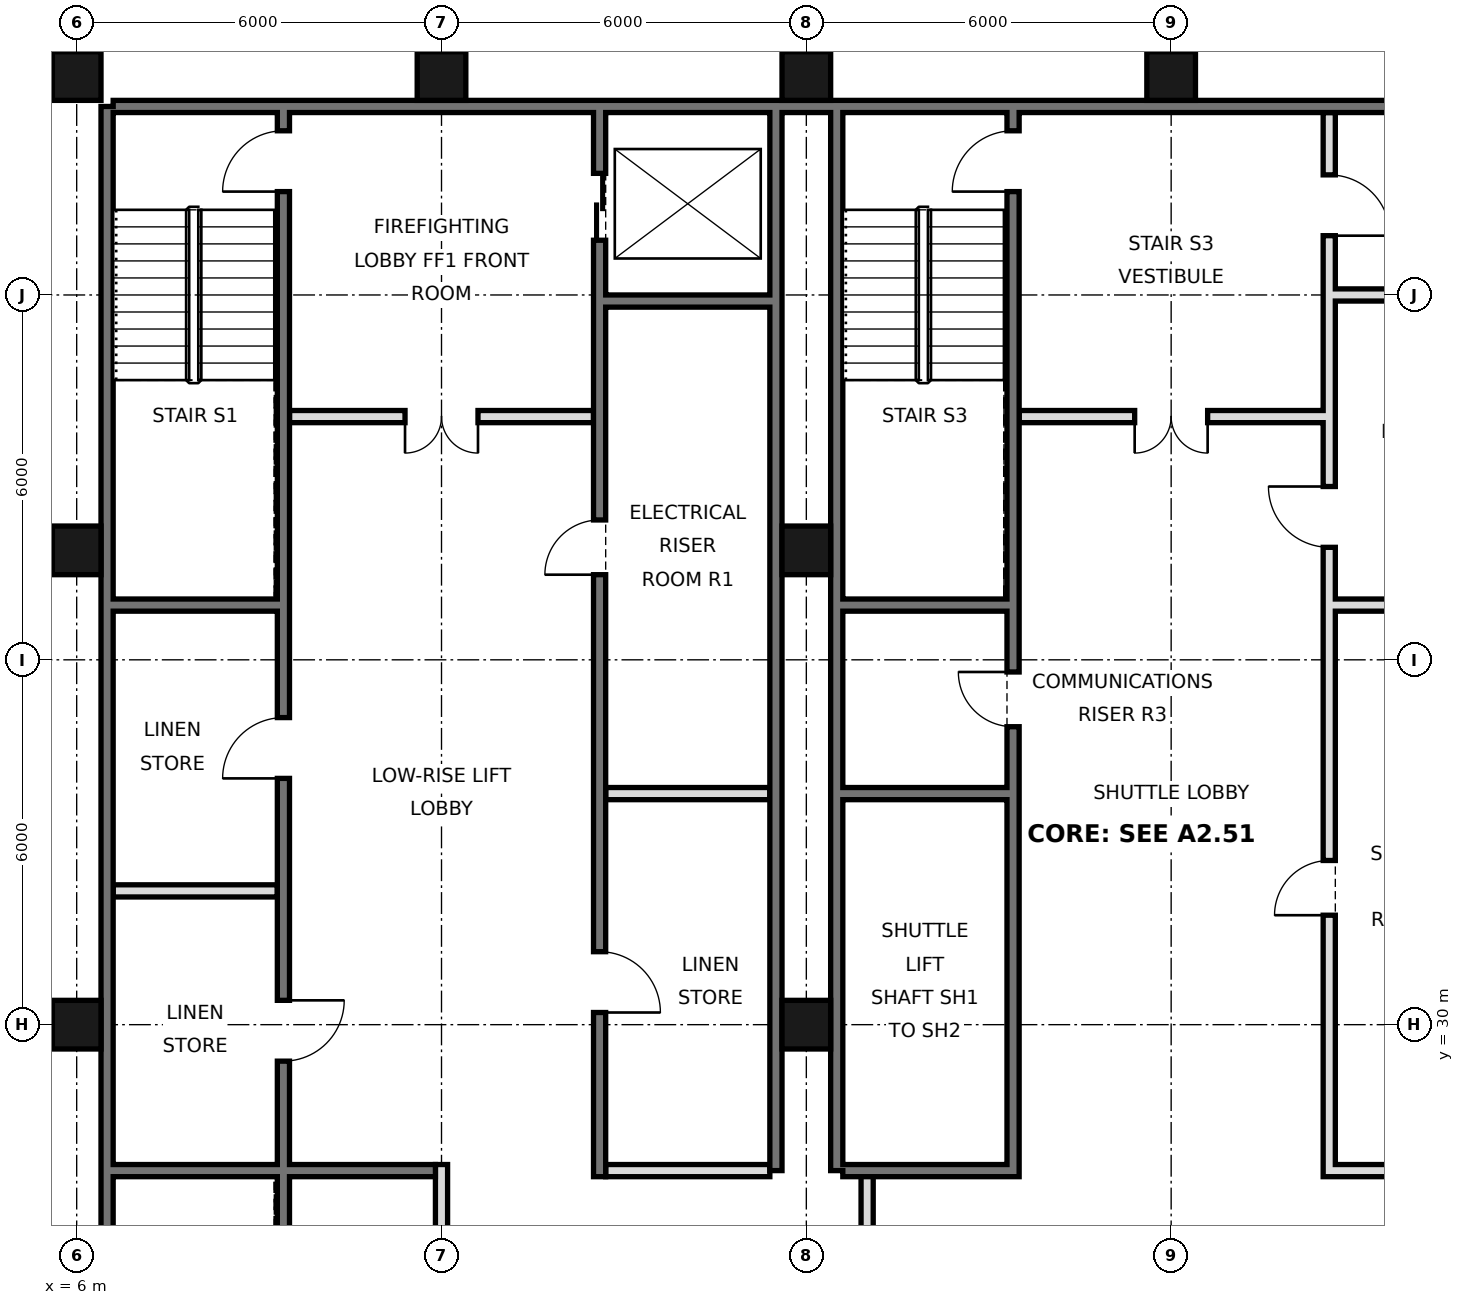
"""IFC4 building model, lengths in metres.
Left out: names, types, materials, properties, quantities, classifications, styles, units other than length and angle.
Written with IfcOpenShell. Run it as: python <this file> out.ifc"""

import sys

from ifc_helpers import new_model, si_unit, direction, frame, frame_2d, origin, origin_2d, place, context, subcontext, project, spatial, rectangle, hollow_rectangle, extrude, element, fill, save


model = new_model("IFC4")
c1 = context("Model", 3, precision=1e-05, world=origin(), true_north=direction((0.0, 1.0)))
c2 = subcontext(c1, "Body", "Model", "MODEL_VIEW")
j1 = project(units=[si_unit("LENGTHUNIT", "METRE"), si_unit("PLANEANGLEUNIT", "RADIAN")], contexts=[c1])
p1 = place(None, origin())
s1 = spatial("IfcSite", under=j1, at=p1, CompositionType="ELEMENT")
p2 = place(p1, origin())
s2 = spatial("IfcBuilding", under=s1, at=p2, CompositionType="ELEMENT")
p3 = place(p2, frame((0.0, 0.0, 202.8)))
s3 = spatial("IfcBuildingStorey", under=s2, at=p3, CompositionType="ELEMENT", Elevation=202.8)
for number, where, z_axis, x_axis in (
    (1, (6.0, 30.0, 0.0), (0.0, 0.0, 1.0), (1.0, 0.0, 0.0)),
    (2, (6.0, 37.8, 0.0), (0.0, 0.0, 1.0), (1.0, 0.0, 0.0)),
    (3, (6.0, 45.6, 0.0), (0.0, 0.0, 1.0), (1.0, 0.0, 0.0)),
    (4, (12.0, 45.6, 0.0), (0.0, 0.0, 1.0), (1.0, 0.0, 0.0)),
    (5, (18.0, 30.0, 0.0), (0.0, 0.0, 1.0), (1.0, 0.0, 0.0)),
    (6, (18.0, 37.8, 0.0), (0.0, 0.0, 1.0), (1.0, 0.0, 0.0)),
    (7, (18.0, 45.6, 0.0), (0.0, 0.0, 1.0), (1.0, 0.0, 0.0)),
    (8, (24.0, 45.6, 0.0), (0.0, 0.0, 1.0), (1.0, 0.0, 0.0)),
):
    element("IfcColumn", number, at=place(p3, frame(where, z_axis=z_axis, x_axis=x_axis)), inside=s3, PredefinedType="COLUMN", context=c2, shape_type="SweptSolid", body=[
        extrude(hollow_rectangle(XDim=0.8, YDim=0.8, WallThickness=0.04, at=origin_2d()), origin(), (0.0, 0.0, 1.0), 3.6),
    ])
p4 = place(p3, frame((6.5, 21.6, 0.0), z_axis=(0.0, 0.0, 1.0), x_axis=(0.0, 1.0, 0.0)))
e9 = element("IfcWall", 9, at=p4, inside=s3, PredefinedType="SOLIDWALL", context=c2, shape_type="SweptSolid", body=[
    extrude(rectangle(XDim=23.5, YDim=0.2, at=frame_2d((11.75, 0.0))), origin(), (0.0, 0.0, 1.0), 3.42),
])
p5 = place(p3, frame((6.6, 45.1, 0.0), z_axis=(0.0, 0.0, 1.0), x_axis=(1.0, 0.0, 0.0)))
e10 = element("IfcWall", 10, at=p5, inside=s3, PredefinedType="SOLIDWALL", context=c2, shape_type="SweptSolid", body=[
    extrude(rectangle(XDim=34.8, YDim=0.2, at=frame_2d((17.4, 0.0))), origin(), (0.0, 0.0, 1.0), 3.42),
])
for number, where, z_axis, x_axis in (
    (11, (17.5, 27.6, 0.0), (0.0, 0.0, 1.0), (0.0, 1.0, 0.0)),
    (12, (18.5, 27.6, 0.0), (0.0, 0.0, 1.0), (0.0, 1.0, 0.0)),
):
    element("IfcWall", number, at=place(p3, frame(where, z_axis=z_axis, x_axis=x_axis)), inside=s3, PredefinedType="SOLIDWALL", context=c2, shape_type="SweptSolid", body=[
        extrude(rectangle(XDim=17.5, YDim=0.2, at=frame_2d((8.75, 0.0))), origin(), (0.0, 0.0, 1.0), 3.42),
    ])
p6 = place(p3, frame((19.0, 21.6, 0.0), z_axis=(0.0, 0.0, 1.0), x_axis=(0.0, 1.0, 0.0)))
e13 = element("IfcWall", 13, at=p6, inside=s3, PredefinedType="PARTITIONING", context=c2, shape_type="SweptSolid", body=[
    extrude(rectangle(XDim=6.0, YDim=0.2, at=frame_2d((3.0, 0.0))), origin(), (0.0, 0.0, 1.0), 3.42),
])
p7 = place(p6, frame((2.1, 0.0, 0.0)))
e14 = element("IfcOpeningElement", 14, at=p7, cuts=e13, PredefinedType="OPENING", context=c2, shape_type="SweptSolid", body=[
    extrude(rectangle(XDim=1.8, YDim=2.1, at=frame_2d((0.9, 1.05))), frame((0.0, 0.11, 0.0), z_axis=(0.0, -1.0, 0.0), x_axis=(1.0, 0.0, 0.0)), (0.0, 0.0, 1.0), 0.22),
])
p8 = place(p3, frame((12.0, 21.6, 0.0), z_axis=(0.0, 0.0, 1.0), x_axis=(0.0, 1.0, 0.0)))
e15 = element("IfcWall", 15, at=p8, inside=s3, PredefinedType="PARTITIONING", context=c2, shape_type="SweptSolid", body=[
    extrude(rectangle(XDim=6.1, YDim=0.2, at=frame_2d((3.05, 0.0))), origin(), (0.0, 0.0, 1.0), 3.42),
])
p9 = place(p3, frame((14.6, 27.5, 0.0), z_axis=(0.0, 0.0, 1.0), x_axis=(0.0, 1.0, 0.0)))
e16 = element("IfcWall", 16, at=p9, inside=s3, PredefinedType="SOLIDWALL", context=c2, shape_type="SweptSolid", body=[
    extrude(rectangle(XDim=17.5, YDim=0.2, at=frame_2d((8.75, 0.0))), origin(), (0.0, 0.0, 1.0), 3.42),
])
p10 = place(p9, frame((15.4, 0.0, 0.0)))
e17 = element("IfcOpeningElement", 17, at=p10, cuts=e16, PredefinedType="OPENING", context=c2, shape_type="SweptSolid", body=[
    extrude(rectangle(XDim=1.1, YDim=2.1, at=frame_2d((0.55, 1.05))), frame((0.0, 0.11, 0.0), z_axis=(0.0, -1.0, 0.0), x_axis=(1.0, 0.0, 0.0)), (0.0, 0.0, 1.0), 0.22),
])
p11 = place(p9, frame((2.7, 0.0, 0.0)))
e18 = element("IfcOpeningElement", 18, at=p11, cuts=e16, PredefinedType="OPENING", context=c2, shape_type="SweptSolid", body=[
    extrude(rectangle(XDim=1.0, YDim=2.1, at=frame_2d((0.5, 1.05))), frame((0.0, 0.11, 0.0), z_axis=(0.0, -1.0, 0.0), x_axis=(1.0, 0.0, 0.0)), (0.0, 0.0, 1.0), 0.22),
])
p12 = place(p9, frame((9.9, 0.0, 0.0)))
e19 = element("IfcOpeningElement", 19, at=p12, cuts=e16, PredefinedType="OPENING", context=c2, shape_type="SweptSolid", body=[
    extrude(rectangle(XDim=0.9, YDim=2.1, at=frame_2d((0.45, 1.05))), frame((0.0, 0.11, 0.0), z_axis=(0.0, -1.0, 0.0), x_axis=(1.0, 0.0, 0.0)), (0.0, 0.0, 1.0), 0.22),
])
p13 = place(p3, frame((21.4, 27.5, 0.0), z_axis=(0.0, 0.0, 1.0), x_axis=(0.0, 1.0, 0.0)))
e20 = element("IfcWall", 20, at=p13, inside=s3, PredefinedType="SOLIDWALL", context=c2, shape_type="SweptSolid", body=[
    extrude(rectangle(XDim=17.5, YDim=0.2, at=frame_2d((8.75, 0.0))), origin(), (0.0, 0.0, 1.0), 3.42),
])
p14 = place(p13, frame((16.2, 0.0, 0.0)))
e21 = element("IfcOpeningElement", 21, at=p14, cuts=e20, PredefinedType="OPENING", context=c2, shape_type="SweptSolid", body=[
    extrude(rectangle(XDim=1.0, YDim=2.1, at=frame_2d((0.5, 1.05))), frame((0.0, 0.11, 0.0), z_axis=(0.0, -1.0, 0.0), x_axis=(1.0, 0.0, 0.0)), (0.0, 0.0, 1.0), 0.22),
])
p15 = place(p13, frame((7.4, 0.0, 0.0)))
e22 = element("IfcOpeningElement", 22, at=p15, cuts=e20, PredefinedType="OPENING", context=c2, shape_type="SweptSolid", body=[
    extrude(rectangle(XDim=0.9, YDim=2.1, at=frame_2d((0.45, 1.05))), frame((0.0, 0.11, 0.0), z_axis=(0.0, -1.0, 0.0), x_axis=(1.0, 0.0, 0.0)), (0.0, 0.0, 1.0), 0.22),
])
p16 = place(p3, frame((26.6, 27.5, 0.0), z_axis=(0.0, 0.0, 1.0), x_axis=(0.0, 1.0, 0.0)))
e23 = element("IfcWall", 23, at=p16, inside=s3, PredefinedType="SOLIDWALL", context=c2, shape_type="SweptSolid", body=[
    extrude(rectangle(XDim=17.5, YDim=0.2, at=frame_2d((8.75, 0.0))), origin(), (0.0, 0.0, 1.0), 3.42),
])
p17 = place(p16, frame((4.3, 0.0, 0.0)))
e24 = element("IfcOpeningElement", 24, at=p17, cuts=e23, PredefinedType="OPENING", context=c2, shape_type="SweptSolid", body=[
    extrude(rectangle(XDim=0.9, YDim=2.1, at=frame_2d((0.45, 1.05))), frame((0.0, 0.11, 0.0), z_axis=(0.0, -1.0, 0.0), x_axis=(1.0, 0.0, 0.0)), (0.0, 0.0, 1.0), 0.22),
])
p18 = place(p16, frame((10.35, 0.0, 0.0)))
e25 = element("IfcOpeningElement", 25, at=p18, cuts=e23, PredefinedType="OPENING", context=c2, shape_type="SweptSolid", body=[
    extrude(rectangle(XDim=1.0, YDim=2.1, at=frame_2d((0.5, 1.05))), frame((0.0, 0.11, 0.0), z_axis=(0.0, -1.0, 0.0), x_axis=(1.0, 0.0, 0.0)), (0.0, 0.0, 1.0), 0.22),
])
p19 = place(p16, frame((15.475, 0.0, 0.0)))
e26 = element("IfcOpeningElement", 26, at=p19, cuts=e23, PredefinedType="OPENING", context=c2, shape_type="SweptSolid", body=[
    extrude(rectangle(XDim=1.0, YDim=2.1, at=frame_2d((0.5, 1.05))), frame((0.0, 0.11, 0.0), z_axis=(0.0, -1.0, 0.0), x_axis=(1.0, 0.0, 0.0)), (0.0, 0.0, 1.0), 0.22),
])
p20 = place(p3, frame((9.4, 21.6, 0.0), z_axis=(0.0, 0.0, 1.0), x_axis=(0.0, 1.0, 0.0)))
e27 = element("IfcWall", 27, at=p20, inside=s3, PredefinedType="SOLIDWALL", context=c2, shape_type="SweptSolid", body=[
    extrude(rectangle(XDim=23.4, YDim=0.2, at=frame_2d((11.7, 0.0))), origin(), (0.0, 0.0, 1.0), 3.42),
])
p21 = place(p20, frame((7.8, 0.0, 0.0)))
e28 = element("IfcOpeningElement", 28, at=p21, cuts=e27, PredefinedType="OPENING", context=c2, shape_type="SweptSolid", body=[
    extrude(rectangle(XDim=1.0, YDim=2.1, at=frame_2d((0.5, 1.05))), frame((0.0, 0.11, 0.0), z_axis=(0.0, -1.0, 0.0), x_axis=(1.0, 0.0, 0.0)), (0.0, 0.0, 1.0), 0.22),
])
p22 = place(p20, frame((12.45, 0.0, 0.0)))
e29 = element("IfcOpeningElement", 29, at=p22, cuts=e27, PredefinedType="OPENING", context=c2, shape_type="SweptSolid", body=[
    extrude(rectangle(XDim=1.0, YDim=2.1, at=frame_2d((0.5, 1.05))), frame((0.0, 0.11, 0.0), z_axis=(0.0, -1.0, 0.0), x_axis=(1.0, 0.0, 0.0)), (0.0, 0.0, 1.0), 0.22),
])
p23 = place(p20, frame((22.1, 0.0, 0.0)))
e30 = element("IfcOpeningElement", 30, at=p23, cuts=e27, PredefinedType="OPENING", context=c2, shape_type="SweptSolid", body=[
    extrude(rectangle(XDim=1.0, YDim=2.1, at=frame_2d((0.5, 1.05))), frame((0.0, 0.11, 0.0), z_axis=(0.0, -1.0, 0.0), x_axis=(1.0, 0.0, 0.0)), (0.0, 0.0, 1.0), 0.22),
])
p24 = place(p20, frame((0.175, 0.0, 0.0)))
e31 = element("IfcOpeningElement", 31, at=p24, cuts=e27, PredefinedType="OPENING", context=c2, shape_type="SweptSolid", body=[
    extrude(rectangle(XDim=0.9, YDim=2.1, at=frame_2d((0.45, 1.05))), frame((0.0, 0.11, 0.0), z_axis=(0.0, -1.0, 0.0), x_axis=(1.0, 0.0, 0.0)), (0.0, 0.0, 1.0), 0.22),
])
p25 = place(p3, frame((14.7, 27.6, 0.0), z_axis=(0.0, 0.0, 1.0), x_axis=(1.0, 0.0, 0.0)))
e32 = element("IfcWall", 32, at=p25, inside=s3, PredefinedType="PARTITIONING", context=c2, shape_type="SweptSolid", body=[
    extrude(rectangle(XDim=2.7, YDim=0.2, at=frame_2d((1.35, 0.0))), origin(), (0.0, 0.0, 1.0), 3.42),
])
for number, where, z_axis, x_axis in (
    (33, (18.6, 27.6, 0.0), (0.0, 0.0, 1.0), (1.0, 0.0, 0.0)),
    (34, (26.7, 27.6, 0.0), (0.0, 0.0, 1.0), (1.0, 0.0, 0.0)),
):
    element("IfcWall", number, at=place(p3, frame(where, z_axis=z_axis, x_axis=x_axis)), inside=s3, PredefinedType="SOLIDWALL", context=c2, shape_type="SweptSolid", body=[
        extrude(rectangle(XDim=2.7, YDim=0.2, at=frame_2d((1.35, 0.0))), origin(), (0.0, 0.0, 1.0), 3.42),
    ])
p26 = place(p3, frame((6.6, 27.6, 0.0), z_axis=(0.0, 0.0, 1.0), x_axis=(1.0, 0.0, 0.0)))
e35 = element("IfcWall", 35, at=p26, inside=s3, PredefinedType="SOLIDWALL", context=c2, shape_type="SweptSolid", body=[
    extrude(rectangle(XDim=5.3, YDim=0.2, at=frame_2d((2.65, 0.0))), origin(), (0.0, 0.0, 1.0), 3.42),
])
p27 = place(p3, frame((6.6, 32.2, 0.0), z_axis=(0.0, 0.0, 1.0), x_axis=(1.0, 0.0, 0.0)))
e36 = element("IfcWall", 36, at=p27, inside=s3, PredefinedType="PARTITIONING", context=c2, shape_type="SweptSolid", body=[
    extrude(rectangle(XDim=2.7, YDim=0.2, at=frame_2d((1.35, 0.0))), origin(), (0.0, 0.0, 1.0), 3.42),
])
for number, where, z_axis, x_axis in (
    (37, (14.7, 33.8, 0.0), (0.0, 0.0, 1.0), (1.0, 0.0, 0.0)),
    (38, (18.6, 33.8, 0.0), (0.0, 0.0, 1.0), (1.0, 0.0, 0.0)),
    (39, (18.6, 36.9, 0.0), (0.0, 0.0, 1.0), (1.0, 0.0, 0.0)),
    (40, (26.7, 36.9, 0.0), (0.0, 0.0, 1.0), (1.0, 0.0, 0.0)),
    (41, (6.6, 36.9, 0.0), (0.0, 0.0, 1.0), (1.0, 0.0, 0.0)),
):
    element("IfcWall", number, at=place(p3, frame(where, z_axis=z_axis, x_axis=x_axis)), inside=s3, PredefinedType="SOLIDWALL", context=c2, shape_type="SweptSolid", body=[
        extrude(rectangle(XDim=2.7, YDim=0.2, at=frame_2d((1.35, 0.0))), origin(), (0.0, 0.0, 1.0), 3.42),
    ])
p28 = place(p3, frame((21.5, 40.0, 0.0), z_axis=(0.0, 0.0, 1.0), x_axis=(1.0, 0.0, 0.0)))
e42 = element("IfcWall", 42, at=p28, inside=s3, PredefinedType="PARTITIONING", context=c2, shape_type="SweptSolid", body=[
    extrude(rectangle(XDim=5.0, YDim=0.2, at=frame_2d((2.5, 0.0))), origin(), (0.0, 0.0, 1.0), 3.42),
])
p29 = place(p28, frame((1.9, 0.0, 0.0)))
e43 = element("IfcOpeningElement", 43, at=p29, cuts=e42, PredefinedType="OPENING", context=c2, shape_type="SweptSolid", body=[
    extrude(rectangle(XDim=1.2, YDim=2.1, at=frame_2d((0.6, 1.05))), frame((0.0, 0.11, 0.0), z_axis=(0.0, -1.0, 0.0), x_axis=(1.0, 0.0, 0.0)), (0.0, 0.0, 1.0), 0.22),
])
p30 = place(p3, frame((9.5, 40.0, 0.0), z_axis=(0.0, 0.0, 1.0), x_axis=(1.0, 0.0, 0.0)))
e44 = element("IfcWall", 44, at=p30, inside=s3, PredefinedType="PARTITIONING", context=c2, shape_type="SweptSolid", body=[
    extrude(rectangle(XDim=5.0, YDim=0.2, at=frame_2d((2.5, 0.0))), origin(), (0.0, 0.0, 1.0), 3.42),
])
p31 = place(p30, frame((1.9, 0.0, 0.0)))
e45 = element("IfcOpeningElement", 45, at=p31, cuts=e44, PredefinedType="OPENING", context=c2, shape_type="SweptSolid", body=[
    extrude(rectangle(XDim=1.2, YDim=2.1, at=frame_2d((0.6, 1.05))), frame((0.0, 0.11, 0.0), z_axis=(0.0, -1.0, 0.0), x_axis=(1.0, 0.0, 0.0)), (0.0, 0.0, 1.0), 0.22),
])
p32 = place(p3, frame((14.7, 41.9, 0.0), z_axis=(0.0, 0.0, 1.0), x_axis=(1.0, 0.0, 0.0)))
e46 = element("IfcWall", 46, at=p32, inside=s3, PredefinedType="SOLIDWALL", context=c2, shape_type="SweptSolid", body=[
    extrude(rectangle(XDim=2.7, YDim=0.2, at=frame_2d((1.35, 0.0))), origin(), (0.0, 0.0, 1.0), 3.42),
])
p33 = place(p3, frame((26.7, 42.0, 0.0), z_axis=(0.0, 0.0, 1.0), x_axis=(1.0, 0.0, 0.0)))
e47 = element("IfcWall", 47, at=p33, inside=s3, PredefinedType="PARTITIONING", context=c2, shape_type="SweptSolid", body=[
    extrude(rectangle(XDim=2.7, YDim=0.2, at=frame_2d((1.35, 0.0))), origin(), (0.0, 0.0, 1.0), 3.42),
])
p34 = place(p31, frame((1.2, 0.0, 0.0), z_axis=(0.0, 0.0, 1.0), x_axis=(-1.0, 0.0, 0.0)))
e48 = element("IfcDoor", 48, at=p34, inside=s3, OperationType="DOUBLE_DOOR_SINGLE_SWING", PredefinedType="DOOR", context=c2, shape_type="SweptSolid", body=[
    extrude(rectangle(XDim=1.2, YDim=2.1, at=frame_2d((0.6, 1.05))), frame((0.0, 0.025, 0.0), z_axis=(0.0, -1.0, 0.0), x_axis=(1.0, 0.0, 0.0)), (0.0, 0.0, 1.0), 0.05),
])
fill(e45, e48)
p35 = place(p29, frame((1.2, 0.0, 0.0), z_axis=(0.0, 0.0, 1.0), x_axis=(-1.0, 0.0, 0.0)))
e49 = element("IfcDoor", 49, at=p35, inside=s3, OperationType="DOUBLE_DOOR_SINGLE_SWING", PredefinedType="DOOR", context=c2, shape_type="SweptSolid", body=[
    extrude(rectangle(XDim=1.2, YDim=2.1, at=frame_2d((0.6, 1.05))), frame((0.0, 0.025, 0.0), z_axis=(0.0, -1.0, 0.0), x_axis=(1.0, 0.0, 0.0)), (0.0, 0.0, 1.0), 0.05),
])
fill(e43, e49)
p36 = place(p10, origin())
e50 = element("IfcDoor", 50, at=p36, inside=s3, OperationType="DOUBLE_DOOR_SLIDING", PredefinedType="DOOR", context=c2, shape_type="SweptSolid", body=[
    extrude(rectangle(XDim=1.1, YDim=2.1, at=frame_2d((0.55, 1.05))), frame((0.0, 0.025, 0.0), z_axis=(0.0, -1.0, 0.0), x_axis=(1.0, 0.0, 0.0)), (0.0, 0.0, 1.0), 0.05),
])
fill(e17, e50)
p37 = place(p11, frame((1.0, 0.0, 0.0), z_axis=(0.0, 0.0, 1.0), x_axis=(-1.0, 0.0, 0.0)))
e51 = element("IfcDoor", 51, at=p37, inside=s3, OperationType="SINGLE_SWING_RIGHT", PredefinedType="DOOR", context=c2, shape_type="SweptSolid", body=[
    extrude(rectangle(XDim=1.0, YDim=2.1, at=frame_2d((0.5, 1.05))), frame((0.0, 0.025, 0.0), z_axis=(0.0, -1.0, 0.0), x_axis=(1.0, 0.0, 0.0)), (0.0, 0.0, 1.0), 0.05),
])
fill(e18, e51)
p38 = place(p21, origin())
e52 = element("IfcDoor", 52, at=p38, inside=s3, OperationType="SINGLE_SWING_RIGHT", PredefinedType="DOOR", context=c2, shape_type="SweptSolid", body=[
    extrude(rectangle(XDim=1.0, YDim=2.1, at=frame_2d((0.5, 1.05))), frame((0.0, 0.025, 0.0), z_axis=(0.0, -1.0, 0.0), x_axis=(1.0, 0.0, 0.0)), (0.0, 0.0, 1.0), 0.05),
])
fill(e28, e52)
p39 = place(p22, origin())
e53 = element("IfcDoor", 53, at=p39, inside=s3, OperationType="SINGLE_SWING_LEFT", PredefinedType="DOOR", context=c2, shape_type="SweptSolid", body=[
    extrude(rectangle(XDim=1.0, YDim=2.1, at=frame_2d((0.5, 1.05))), frame((0.0, 0.025, 0.0), z_axis=(0.0, -1.0, 0.0), x_axis=(1.0, 0.0, 0.0)), (0.0, 0.0, 1.0), 0.05),
])
fill(e29, e53)
p40 = place(p23, origin())
e54 = element("IfcDoor", 54, at=p40, inside=s3, OperationType="SINGLE_SWING_LEFT", PredefinedType="DOOR", context=c2, shape_type="SweptSolid", body=[
    extrude(rectangle(XDim=1.0, YDim=2.1, at=frame_2d((0.5, 1.05))), frame((0.0, 0.025, 0.0), z_axis=(0.0, -1.0, 0.0), x_axis=(1.0, 0.0, 0.0)), (0.0, 0.0, 1.0), 0.05),
])
fill(e30, e54)
p41 = place(p14, origin())
e55 = element("IfcDoor", 55, at=p41, inside=s3, OperationType="SINGLE_SWING_LEFT", PredefinedType="DOOR", context=c2, shape_type="SweptSolid", body=[
    extrude(rectangle(XDim=1.0, YDim=2.1, at=frame_2d((0.5, 1.05))), frame((0.0, 0.025, 0.0), z_axis=(0.0, -1.0, 0.0), x_axis=(1.0, 0.0, 0.0)), (0.0, 0.0, 1.0), 0.05),
])
fill(e21, e55)
p42 = place(p12, origin())
e56 = element("IfcDoor", 56, at=p42, inside=s3, OperationType="SINGLE_SWING_LEFT", PredefinedType="DOOR", context=c2, shape_type="SweptSolid", body=[
    extrude(rectangle(XDim=0.9, YDim=2.1, at=frame_2d((0.45, 1.05))), frame((0.0, 0.025, 0.0), z_axis=(0.0, -1.0, 0.0), x_axis=(1.0, 0.0, 0.0)), (0.0, 0.0, 1.0), 0.05),
])
fill(e19, e56)
p43 = place(p15, frame((0.9, 0.0, 0.0), z_axis=(0.0, 0.0, 1.0), x_axis=(-1.0, 0.0, 0.0)))
e57 = element("IfcDoor", 57, at=p43, inside=s3, OperationType="SINGLE_SWING_LEFT", PredefinedType="DOOR", context=c2, shape_type="SweptSolid", body=[
    extrude(rectangle(XDim=0.9, YDim=2.1, at=frame_2d((0.45, 1.05))), frame((0.0, 0.025, 0.0), z_axis=(0.0, -1.0, 0.0), x_axis=(1.0, 0.0, 0.0)), (0.0, 0.0, 1.0), 0.05),
])
fill(e22, e57)
p44 = place(p17, origin())
e58 = element("IfcDoor", 58, at=p44, inside=s3, OperationType="SINGLE_SWING_LEFT", PredefinedType="DOOR", context=c2, shape_type="SweptSolid", body=[
    extrude(rectangle(XDim=0.9, YDim=2.1, at=frame_2d((0.45, 1.05))), frame((0.0, 0.025, 0.0), z_axis=(0.0, -1.0, 0.0), x_axis=(1.0, 0.0, 0.0)), (0.0, 0.0, 1.0), 0.05),
])
fill(e24, e58)
p45 = place(p18, frame((1.0, 0.0, 0.0), z_axis=(0.0, 0.0, 1.0), x_axis=(-1.0, 0.0, 0.0)))
e59 = element("IfcDoor", 59, at=p45, inside=s3, OperationType="SINGLE_SWING_LEFT", PredefinedType="DOOR", context=c2, shape_type="SweptSolid", body=[
    extrude(rectangle(XDim=1.0, YDim=2.1, at=frame_2d((0.5, 1.05))), frame((0.0, 0.025, 0.0), z_axis=(0.0, -1.0, 0.0), x_axis=(1.0, 0.0, 0.0)), (0.0, 0.0, 1.0), 0.05),
])
fill(e25, e59)
p46 = place(p19, frame((1.0, 0.0, 0.0), z_axis=(0.0, 0.0, 1.0), x_axis=(-1.0, 0.0, 0.0)))
e60 = element("IfcDoor", 60, at=p46, inside=s3, OperationType="SINGLE_SWING_RIGHT", PredefinedType="DOOR", context=c2, shape_type="SweptSolid", body=[
    extrude(rectangle(XDim=1.0, YDim=2.1, at=frame_2d((0.5, 1.05))), frame((0.0, 0.025, 0.0), z_axis=(0.0, -1.0, 0.0), x_axis=(1.0, 0.0, 0.0)), (0.0, 0.0, 1.0), 0.05),
])
fill(e26, e60)
save(model, sys.argv[1])
